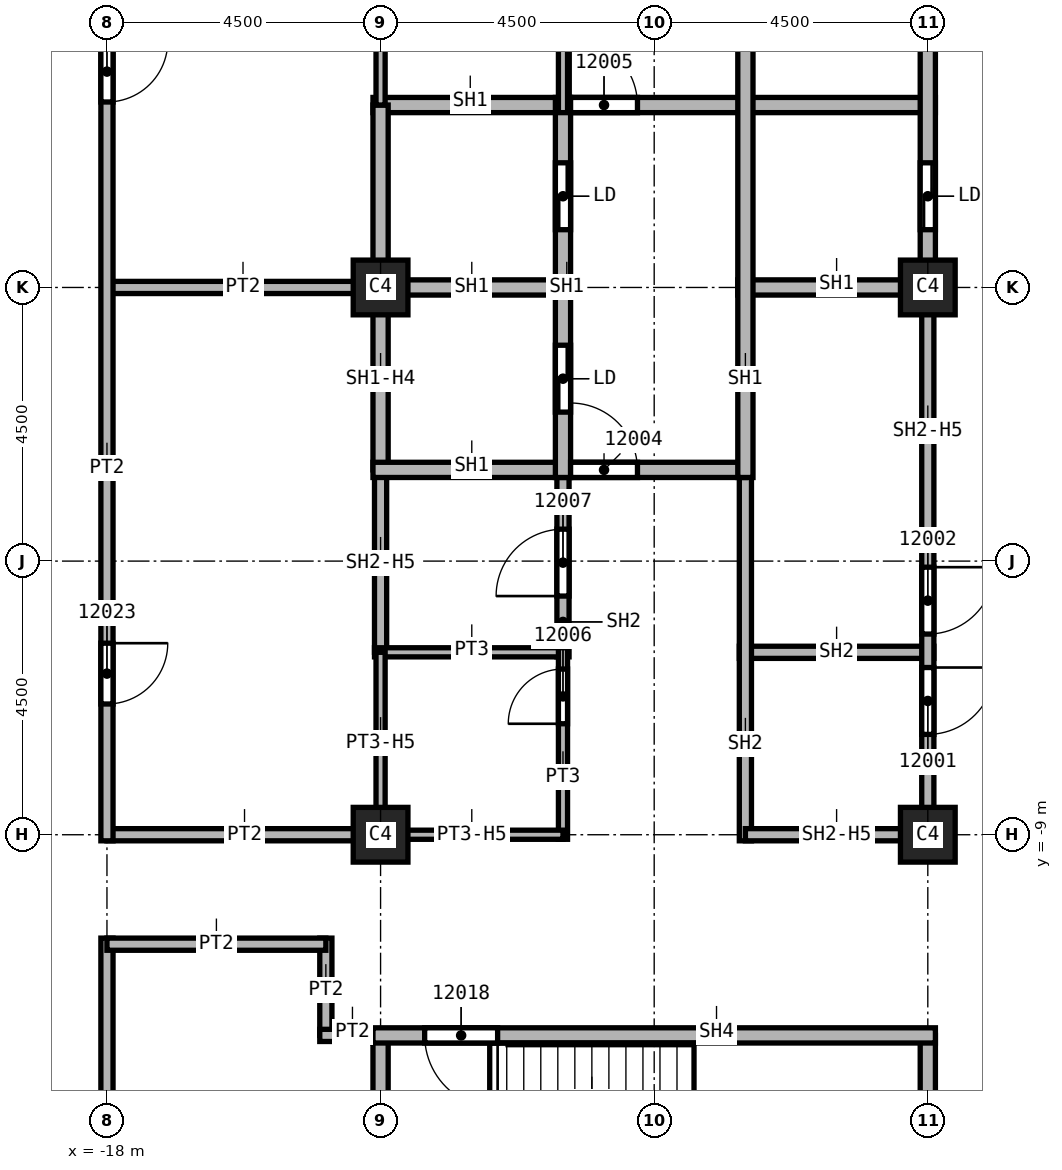
"""IFC4 building model, lengths in metres.
Left out: names, types, materials, properties, quantities, classifications, styles, units other than length and angle.
Written with IfcOpenShell. Run it as: python <this file> out.ifc"""

import sys

from ifc_helpers import new_model, si_unit, direction, frame, frame_2d, origin, origin_2d, place, context, subcontext, project, spatial, rectangle, extrude, element, fill, save


model = new_model("IFC4")
c1 = context("Model", 3, precision=1e-05, world=origin(), true_north=direction((0.0, 1.0)))
c2 = subcontext(c1, "Body", "Model", "MODEL_VIEW")
j1 = project(units=[si_unit("LENGTHUNIT", "METRE"), si_unit("PLANEANGLEUNIT", "RADIAN")], contexts=[c1])
p1 = place(None, origin())
s1 = spatial("IfcSite", under=j1, at=p1, CompositionType="ELEMENT")
p2 = place(p1, origin())
s2 = spatial("IfcBuilding", under=s1, at=p2, CompositionType="ELEMENT")
p3 = place(p2, frame((0.0, 0.0, 196.0)))
s3 = spatial("IfcBuildingStorey", under=s2, at=p3, CompositionType="ELEMENT", Elevation=196.0)
for number, where, z_axis, x_axis in (
    (1, (-4.5, 0.0, 0.0), (0.0, 0.0, 1.0), (1.0, 0.0, 0.0)),
    (2, (-4.5, -9.0, 0.0), (0.0, 0.0, 1.0), (1.0, 0.0, 0.0)),
    (3, (-13.5, 0.0, 0.0), (0.0, 0.0, 1.0), (1.0, 0.0, 0.0)),
    (4, (-13.5, -9.0, 0.0), (0.0, 0.0, 1.0), (1.0, 0.0, 0.0)),
):
    element("IfcColumn", number, at=place(p3, frame(where, z_axis=z_axis, x_axis=x_axis)), inside=s3, PredefinedType="COLUMN", context=c2, shape_type="SweptSolid", body=[
        extrude(rectangle(XDim=0.9, YDim=0.9, at=origin_2d()), origin(), (0.0, 0.0, 1.0), 3.72),
    ])
p4 = place(p3, frame((-18.0, -10.7, 0.0), z_axis=(0.0, 0.0, 1.0), x_axis=(0.0, -1.0, 0.0)))
e5 = element("IfcWall", 5, at=p4, inside=s3, PredefinedType="PARTITIONING", context=c2, shape_type="SweptSolid", body=[
    extrude(rectangle(XDim=11.6, YDim=0.2, at=frame_2d((5.8, 0.0))), origin(), (0.0, 0.0, 1.0), 3.72),
])
p5 = place(p4, frame((8.75, 0.0, 0.0)))
e6 = element("IfcOpeningElement", 6, at=p5, cuts=e5, PredefinedType="OPENING", context=c2, shape_type="SweptSolid", body=[
    extrude(rectangle(XDim=1.0, YDim=2.1, at=frame_2d((0.5, 1.05))), frame((0.0, 0.1, 0.0), z_axis=(0.0, -1.0, 0.0), x_axis=(1.0, 0.0, 0.0)), (0.0, 0.0, 1.0), 0.2),
])
for number, where, z_axis, x_axis in (
    (7, (-18.0, -9.0, 0.0), (0.0, 0.0, 1.0), (1.0, 0.0, 0.0)),
    (8, (-18.0, 0.0, 0.0), (0.0, 0.0, 1.0), (1.0, 0.0, 0.0)),
):
    element("IfcWall", number, at=place(p3, frame(where, z_axis=z_axis, x_axis=x_axis)), inside=s3, PredefinedType="PARTITIONING", context=c2, shape_type="SweptSolid", body=[
        extrude(rectangle(XDim=4.5, YDim=0.2, at=frame_2d((2.25, 0.0))), origin(), (0.0, 0.0, 1.0), 3.72),
    ])
p6 = place(p3, frame((-18.0, 9.1, 0.0), z_axis=(0.0, 0.0, 1.0), x_axis=(0.0, -1.0, 0.0)))
e9 = element("IfcWall", 9, at=p6, inside=s3, PredefinedType="PARTITIONING", context=c2, shape_type="SweptSolid", body=[
    extrude(rectangle(XDim=18.2, YDim=0.2, at=frame_2d((9.1, 0.0))), origin(), (0.0, 0.0, 1.0), 3.72),
])
p7 = place(p6, frame((14.95, 0.0, 0.0)))
e10 = element("IfcOpeningElement", 10, at=p7, cuts=e9, PredefinedType="OPENING", context=c2, shape_type="SweptSolid", body=[
    extrude(rectangle(XDim=1.0, YDim=2.1, at=frame_2d((0.5, 1.05))), frame((0.0, 0.1, 0.0), z_axis=(0.0, -1.0, 0.0), x_axis=(1.0, 0.0, 0.0)), (0.0, 0.0, 1.0), 0.2),
])
p8 = place(p6, frame((5.05, 0.0, 0.0)))
e11 = element("IfcOpeningElement", 11, at=p8, cuts=e9, PredefinedType="OPENING", context=c2, shape_type="SweptSolid", body=[
    extrude(rectangle(XDim=1.0, YDim=2.1, at=frame_2d((0.5, 1.05))), frame((0.0, 0.1, 0.0), z_axis=(0.0, -1.0, 0.0), x_axis=(1.0, 0.0, 0.0)), (0.0, 0.0, 1.0), 0.2),
])
p9 = place(p3, frame((-14.4, -12.3, 0.0), z_axis=(0.0, 0.0, 1.0), x_axis=(0.0, 1.0, 0.0)))
e12 = element("IfcWall", 12, at=p9, inside=s3, PredefinedType="PARTITIONING", context=c2, shape_type="SweptSolid", body=[
    extrude(rectangle(XDim=1.6, YDim=0.2, at=frame_2d((0.8, 0.0))), origin(), (0.0, 0.0, 1.0), 3.72),
])
p10 = place(p3, frame((-14.4, -10.8, 0.0), z_axis=(0.0, 0.0, 1.0), x_axis=(-1.0, 0.0, 0.0)))
e13 = element("IfcWall", 13, at=p10, inside=s3, PredefinedType="PARTITIONING", context=c2, shape_type="SweptSolid", body=[
    extrude(rectangle(XDim=3.6, YDim=0.2, at=frame_2d((1.8, 0.0))), origin(), (0.0, 0.0, 1.0), 3.72),
])
p11 = place(p3, frame((-13.375, -12.3, 0.0), z_axis=(0.0, 0.0, 1.0), x_axis=(-1.0, 0.0, 0.0)))
e14 = element("IfcWall", 14, at=p11, inside=s3, PredefinedType="PARTITIONING", context=c2, shape_type="SweptSolid", body=[
    extrude(rectangle(XDim=1.125, YDim=0.2, at=frame_2d((0.562, 0.0))), origin(), (0.0, 0.0, 1.0), 3.72),
])
p12 = place(p3, frame((-13.5, -6.0, 0.0), z_axis=(0.0, 0.0, 1.0), x_axis=(0.0, 1.0, 0.0)))
e15 = element("IfcWall", 15, at=p12, inside=s3, PredefinedType="SOLIDWALL", context=c2, shape_type="SweptSolid", body=[
    extrude(rectangle(XDim=3.0, YDim=0.2, at=frame_2d((1.5, 0.0))), origin(), (0.0, 0.0, 1.0), 2.958),
])
p13 = place(p3, frame((-10.5, -6.075, 0.0), z_axis=(0.0, 0.0, 1.0), x_axis=(0.0, 1.0, 0.0)))
e16 = element("IfcWall", 16, at=p13, inside=s3, PredefinedType="SOLIDWALL", context=c2, shape_type="SweptSolid", body=[
    extrude(rectangle(XDim=3.2, YDim=0.2, at=frame_2d((1.6, 0.0))), origin(), (0.0, 0.0, 1.0), 3.72),
])
p14 = place(p13, frame((1.0, 0.0, 0.0)))
e17 = element("IfcOpeningElement", 17, at=p14, cuts=e16, PredefinedType="OPENING", context=c2, shape_type="SweptSolid", body=[
    extrude(rectangle(XDim=1.1, YDim=2.1, at=frame_2d((0.55, 1.05))), frame((0.0, 0.1, 0.0), z_axis=(0.0, -1.0, 0.0), x_axis=(1.0, 0.0, 0.0)), (0.0, 0.0, 1.0), 0.2),
])
p15 = place(p3, frame((-7.6, -6.0, 0.0), z_axis=(0.0, 0.0, 1.0), x_axis=(1.0, 0.0, 0.0)))
e18 = element("IfcWall", 18, at=p15, inside=s3, PredefinedType="SOLIDWALL", context=c2, shape_type="SweptSolid", body=[
    extrude(rectangle(XDim=3.2, YDim=0.2, at=frame_2d((1.6, 0.0))), origin(), (0.0, 0.0, 1.0), 3.72),
])
p16 = place(p3, frame((-7.5, -9.1, 0.0), z_axis=(0.0, 0.0, 1.0), x_axis=(0.0, 1.0, 0.0)))
e19 = element("IfcWall", 19, at=p16, inside=s3, PredefinedType="SOLIDWALL", context=c2, shape_type="SweptSolid", body=[
    extrude(rectangle(XDim=6.225, YDim=0.2, at=frame_2d((3.113, 0.0))), origin(), (0.0, 0.0, 1.0), 3.72),
])
p17 = place(p3, frame((-4.5, -9.0, 0.0), z_axis=(0.0, 0.0, 1.0), x_axis=(-1.0, 0.0, 0.0)))
e20 = element("IfcWall", 20, at=p17, inside=s3, PredefinedType="SOLIDWALL", context=c2, shape_type="SweptSolid", body=[
    extrude(rectangle(XDim=3.0, YDim=0.2, at=frame_2d((1.5, 0.0))), origin(), (0.0, 0.0, 1.0), 2.958),
])
p18 = place(p3, frame((-4.5, 0.0, 0.0), z_axis=(0.0, 0.0, 1.0), x_axis=(0.0, -1.0, 0.0)))
e21 = element("IfcWall", 21, at=p18, inside=s3, PredefinedType="SOLIDWALL", context=c2, shape_type="SweptSolid", body=[
    extrude(rectangle(XDim=9.1, YDim=0.2, at=frame_2d((4.55, 0.0))), origin(), (0.0, 0.0, 1.0), 2.958),
])
p19 = place(p18, frame((6.25, 0.0, 0.0)))
e22 = element("IfcOpeningElement", 22, at=p19, cuts=e21, PredefinedType="OPENING", context=c2, shape_type="SweptSolid", body=[
    extrude(rectangle(XDim=1.1, YDim=2.1, at=frame_2d((0.55, 1.05))), frame((0.0, 0.1, 0.0), z_axis=(0.0, -1.0, 0.0), x_axis=(1.0, 0.0, 0.0)), (0.0, 0.0, 1.0), 0.2),
])
p20 = place(p18, frame((4.6, 0.0, 0.0)))
e23 = element("IfcOpeningElement", 23, at=p20, cuts=e21, PredefinedType="OPENING", context=c2, shape_type="SweptSolid", body=[
    extrude(rectangle(XDim=1.1, YDim=2.1, at=frame_2d((0.55, 1.05))), frame((0.0, 0.1, 0.0), z_axis=(0.0, -1.0, 0.0), x_axis=(1.0, 0.0, 0.0)), (0.0, 0.0, 1.0), 0.2),
])
p21 = place(p3, frame((-13.625, 0.0, 0.0), z_axis=(0.0, 0.0, 1.0), x_axis=(1.0, 0.0, 0.0)))
e24 = element("IfcWall", 24, at=p21, inside=s3, PredefinedType="SOLIDWALL", context=c2, shape_type="SweptSolid", body=[
    extrude(rectangle(XDim=3.125, YDim=0.25, at=frame_2d((1.562, 0.0))), origin(), (0.0, 0.0, 1.0), 3.72),
])
p22 = place(p3, frame((-13.625, 3.0, 0.0), z_axis=(0.0, 0.0, 1.0), x_axis=(1.0, 0.0, 0.0)))
e25 = element("IfcWall", 25, at=p22, inside=s3, PredefinedType="SOLIDWALL", context=c2, shape_type="SweptSolid", body=[
    extrude(rectangle(XDim=9.25, YDim=0.25, at=frame_2d((4.625, 0.0))), origin(), (0.0, 0.0, 1.0), 3.72),
])
p23 = place(p22, frame((3.25, 0.0, 0.0)))
e26 = element("IfcOpeningElement", 26, at=p23, cuts=e25, PredefinedType="OPENING", context=c2, shape_type="SweptSolid", body=[
    extrude(rectangle(XDim=1.1, YDim=2.1, at=frame_2d((0.55, 1.05))), frame((0.0, 0.125, 0.0), z_axis=(0.0, -1.0, 0.0), x_axis=(1.0, 0.0, 0.0)), (0.0, 0.0, 1.0), 0.25),
])
p24 = place(p3, frame((-13.5, -3.0, 0.0), z_axis=(0.0, 0.0, 1.0), x_axis=(0.0, 1.0, 0.0)))
e27 = element("IfcWall", 27, at=p24, inside=s3, PredefinedType="SOLIDWALL", context=c2, shape_type="SweptSolid", body=[
    extrude(rectangle(XDim=6.0, YDim=0.25, at=frame_2d((3.0, 0.0))), origin(), (0.0, 0.0, 1.0), 2.958),
])
p25 = place(p3, frame((-13.625, -3.0, 0.0), z_axis=(0.0, 0.0, 1.0), x_axis=(1.0, 0.0, 0.0)))
e28 = element("IfcWall", 28, at=p25, inside=s3, PredefinedType="SOLIDWALL", context=c2, shape_type="SweptSolid", body=[
    extrude(rectangle(XDim=6.125, YDim=0.25, at=frame_2d((3.062, 0.0))), origin(), (0.0, 0.0, 1.0), 3.72),
])
p26 = place(p25, frame((3.25, 0.0, 0.0)))
e29 = element("IfcOpeningElement", 29, at=p26, cuts=e28, PredefinedType="OPENING", context=c2, shape_type="SweptSolid", body=[
    extrude(rectangle(XDim=1.1, YDim=2.1, at=frame_2d((0.55, 1.05))), frame((0.0, 0.125, 0.0), z_axis=(0.0, -1.0, 0.0), x_axis=(1.0, 0.0, 0.0)), (0.0, 0.0, 1.0), 0.25),
])
p27 = place(p3, frame((-10.5, -3.125, 0.0), z_axis=(0.0, 0.0, 1.0), x_axis=(0.0, 1.0, 0.0)))
e30 = element("IfcWall", 30, at=p27, inside=s3, PredefinedType="SOLIDWALL", context=c2, shape_type="SweptSolid", body=[
    extrude(rectangle(XDim=6.25, YDim=0.25, at=frame_2d((3.125, 0.0))), origin(), (0.0, 0.0, 1.0), 3.72),
])
p28 = place(p27, frame((1.075, 0.0, 0.0)))
e31 = element("IfcOpeningElement", 31, at=p28, cuts=e30, PredefinedType="OPENING", context=c2, shape_type="SweptSolid", body=[
    extrude(rectangle(XDim=1.1, YDim=2.1, at=frame_2d((0.55, 1.05))), frame((0.0, 0.125, 0.0), z_axis=(0.0, -1.0, 0.0), x_axis=(1.0, 0.0, 0.0)), (0.0, 0.0, 1.0), 0.25),
])
p29 = place(p27, frame((4.075, 0.0, 0.0)))
e32 = element("IfcOpeningElement", 32, at=p29, cuts=e30, PredefinedType="OPENING", context=c2, shape_type="SweptSolid", body=[
    extrude(rectangle(XDim=1.1, YDim=2.1, at=frame_2d((0.55, 1.05))), frame((0.0, 0.125, 0.0), z_axis=(0.0, -1.0, 0.0), x_axis=(1.0, 0.0, 0.0)), (0.0, 0.0, 1.0), 0.25),
])
p30 = place(p3, frame((-7.625, 0.0, 0.0), z_axis=(0.0, 0.0, 1.0), x_axis=(1.0, 0.0, 0.0)))
e33 = element("IfcWall", 33, at=p30, inside=s3, PredefinedType="SOLIDWALL", context=c2, shape_type="SweptSolid", body=[
    extrude(rectangle(XDim=3.25, YDim=0.25, at=frame_2d((1.625, 0.0))), origin(), (0.0, 0.0, 1.0), 3.72),
])
p31 = place(p3, frame((-7.5, -3.125, 0.0), z_axis=(0.0, 0.0, 1.0), x_axis=(0.0, 1.0, 0.0)))
e34 = element("IfcWall", 34, at=p31, inside=s3, PredefinedType="SOLIDWALL", context=c2, shape_type="SweptSolid", body=[
    extrude(rectangle(XDim=9.125, YDim=0.25, at=frame_2d((4.562, 0.0))), origin(), (0.0, 0.0, 1.0), 3.72),
])
p32 = place(p3, frame((-4.5, 6.0, 0.0), z_axis=(0.0, 0.0, 1.0), x_axis=(0.0, -1.0, 0.0)))
e35 = element("IfcWall", 35, at=p32, inside=s3, PredefinedType="SOLIDWALL", context=c2, shape_type="SweptSolid", body=[
    extrude(rectangle(XDim=6.0, YDim=0.25, at=frame_2d((3.0, 0.0))), origin(), (0.0, 0.0, 1.0), 2.958),
])
p33 = place(p32, frame((3.95, 0.0, 0.0)))
e36 = element("IfcOpeningElement", 36, at=p33, cuts=e35, PredefinedType="OPENING", context=c2, shape_type="SweptSolid", body=[
    extrude(rectangle(XDim=1.1, YDim=2.1, at=frame_2d((0.55, 1.05))), frame((0.0, 0.125, 0.0), z_axis=(0.0, -1.0, 0.0), x_axis=(1.0, 0.0, 0.0)), (0.0, 0.0, 1.0), 0.25),
])
p34 = place(p32, frame((0.95, 0.0, 0.0)))
e37 = element("IfcOpeningElement", 37, at=p34, cuts=e35, PredefinedType="OPENING", context=c2, shape_type="SweptSolid", body=[
    extrude(rectangle(XDim=1.1, YDim=2.1, at=frame_2d((0.55, 1.05))), frame((0.0, 0.125, 0.0), z_axis=(0.0, -1.0, 0.0), x_axis=(1.0, 0.0, 0.0)), (0.0, 0.0, 1.0), 0.25),
])
p35 = place(p3, frame((-13.5, -16.8, 0.0), z_axis=(0.0, 0.0, 1.0), x_axis=(0.0, 1.0, 0.0)))
e38 = element("IfcWall", 38, at=p35, inside=s3, PredefinedType="SOLIDWALL", context=c2, shape_type="SweptSolid", body=[
    extrude(rectangle(XDim=4.5, YDim=0.25, at=frame_2d((2.25, 0.0))), origin(), (0.0, 0.0, 1.0), 3.72),
])
p36 = place(p3, frame((-4.5, -12.3, 0.0), z_axis=(0.0, 0.0, 1.0), x_axis=(0.0, -1.0, 0.0)))
e39 = element("IfcWall", 39, at=p36, inside=s3, PredefinedType="SOLIDWALL", context=c2, shape_type="SweptSolid", body=[
    extrude(rectangle(XDim=4.625, YDim=0.25, at=frame_2d((2.312, 0.0))), origin(), (0.0, 0.0, 1.0), 3.72),
])
p37 = place(p3, frame((-4.375, -12.3, 0.0), z_axis=(0.0, 0.0, 1.0), x_axis=(-1.0, 0.0, 0.0)))
e40 = element("IfcWall", 40, at=p37, inside=s3, PredefinedType="SOLIDWALL", context=c2, shape_type="SweptSolid", body=[
    extrude(rectangle(XDim=9.25, YDim=0.25, at=frame_2d((4.625, 0.0))), origin(), (0.0, 0.0, 1.0), 3.72),
])
p38 = place(p37, frame((7.2, 0.0, 0.0)))
e41 = element("IfcOpeningElement", 41, at=p38, cuts=e40, PredefinedType="OPENING", context=c2, shape_type="SweptSolid", body=[
    extrude(rectangle(XDim=1.2, YDim=2.1, at=frame_2d((0.6, 1.05))), frame((0.0, 0.125, 0.0), z_axis=(0.0, -1.0, 0.0), x_axis=(1.0, 0.0, 0.0)), (0.0, 0.0, 1.0), 0.25),
])
p39 = place(p3, frame((-13.6, -6.0, 0.0), z_axis=(0.0, 0.0, 1.0), x_axis=(1.0, 0.0, 0.0)))
e42 = element("IfcWall", 42, at=p39, inside=s3, PredefinedType="PARTITIONING", context=c2, shape_type="SweptSolid", body=[
    extrude(rectangle(XDim=3.1, YDim=0.15, at=frame_2d((1.55, 0.0))), origin(), (0.0, 0.0, 1.0), 3.72),
])
p40 = place(p3, frame((-13.5, -9.1, 0.0), z_axis=(0.0, 0.0, 1.0), x_axis=(0.0, 1.0, 0.0)))
e43 = element("IfcWall", 43, at=p40, inside=s3, PredefinedType="PARTITIONING", context=c2, shape_type="SweptSolid", body=[
    extrude(rectangle(XDim=3.1, YDim=0.15, at=frame_2d((1.55, 0.0))), origin(), (0.0, 0.0, 1.0), 2.958),
])
p41 = place(p3, frame((-13.5, 3.0, 0.0), z_axis=(0.0, 0.0, 1.0), x_axis=(0.0, 1.0, 0.0)))
e44 = element("IfcWall", 44, at=p41, inside=s3, PredefinedType="PARTITIONING", context=c2, shape_type="SweptSolid", body=[
    extrude(rectangle(XDim=6.1, YDim=0.15, at=frame_2d((3.05, 0.0))), origin(), (0.0, 0.0, 1.0), 2.958),
])
p42 = place(p3, frame((-10.5, -9.075, 0.0), z_axis=(0.0, 0.0, 1.0), x_axis=(0.0, 1.0, 0.0)))
e45 = element("IfcWall", 45, at=p42, inside=s3, PredefinedType="PARTITIONING", context=c2, shape_type="SweptSolid", body=[
    extrude(rectangle(XDim=3.15, YDim=0.15, at=frame_2d((1.575, 0.0))), origin(), (0.0, 0.0, 1.0), 3.72),
])
p43 = place(p42, frame((1.9, 0.0, 0.0)))
e46 = element("IfcOpeningElement", 46, at=p43, cuts=e45, PredefinedType="OPENING", context=c2, shape_type="SweptSolid", body=[
    extrude(rectangle(XDim=0.9, YDim=2.1, at=frame_2d((0.45, 1.05))), frame((0.0, 0.075, 0.0), z_axis=(0.0, -1.0, 0.0), x_axis=(1.0, 0.0, 0.0)), (0.0, 0.0, 1.0), 0.15),
])
p44 = place(p3, frame((-10.5, -9.0, 0.0), z_axis=(0.0, 0.0, 1.0), x_axis=(-1.0, 0.0, 0.0)))
e47 = element("IfcWall", 47, at=p44, inside=s3, PredefinedType="PARTITIONING", context=c2, shape_type="SweptSolid", body=[
    extrude(rectangle(XDim=3.075, YDim=0.15, at=frame_2d((1.538, 0.0))), origin(), (0.0, 0.0, 1.0), 2.958),
])
p45 = place(p3, frame((-10.5, 2.875, 0.0), z_axis=(0.0, 0.0, 1.0), x_axis=(0.0, 1.0, 0.0)))
e48 = element("IfcWall", 48, at=p45, inside=s3, PredefinedType="PARTITIONING", context=c2, shape_type="SweptSolid", body=[
    extrude(rectangle(XDim=6.2, YDim=0.15, at=frame_2d((3.1, 0.0))), origin(), (0.0, 0.0, 1.0), 3.72),
])
p46 = place(p45, frame((1.75, 0.0, 0.0)))
e49 = element("IfcOpeningElement", 49, at=p46, cuts=e48, PredefinedType="OPENING", context=c2, shape_type="SweptSolid", body=[
    extrude(rectangle(XDim=0.9, YDim=2.1, at=frame_2d((0.45, 1.05))), frame((0.0, 0.075, 0.0), z_axis=(0.0, -1.0, 0.0), x_axis=(1.0, 0.0, 0.0)), (0.0, 0.0, 1.0), 0.15),
])
p47 = place(p19, origin())
e50 = element("IfcDoor", 50, at=p47, inside=s3, OperationType="SINGLE_SWING_RIGHT", PredefinedType="DOOR", context=c2, shape_type="SweptSolid", body=[
    extrude(rectangle(XDim=1.1, YDim=2.1, at=frame_2d((0.55, 1.05))), frame((0.0, 0.025, 0.0), z_axis=(0.0, -1.0, 0.0), x_axis=(1.0, 0.0, 0.0)), (0.0, 0.0, 1.0), 0.05),
])
fill(e22, e50)
p48 = place(p20, origin())
e51 = element("IfcDoor", 51, at=p48, inside=s3, OperationType="SINGLE_SWING_LEFT", PredefinedType="DOOR", context=c2, shape_type="SweptSolid", body=[
    extrude(rectangle(XDim=1.1, YDim=2.1, at=frame_2d((0.55, 1.05))), frame((0.0, 0.025, 0.0), z_axis=(0.0, -1.0, 0.0), x_axis=(1.0, 0.0, 0.0)), (0.0, 0.0, 1.0), 0.05),
])
fill(e23, e51)
p49 = place(p26, origin())
e52 = element("IfcDoor", 52, at=p49, inside=s3, OperationType="SINGLE_SWING_LEFT", PredefinedType="DOOR", context=c2, shape_type="SweptSolid", body=[
    extrude(rectangle(XDim=1.1, YDim=2.1, at=frame_2d((0.55, 1.05))), frame((0.0, 0.025, 0.0), z_axis=(0.0, -1.0, 0.0), x_axis=(1.0, 0.0, 0.0)), (0.0, 0.0, 1.0), 0.05),
])
fill(e29, e52)
p50 = place(p23, origin())
e53 = element("IfcDoor", 53, at=p50, inside=s3, OperationType="SINGLE_SWING_RIGHT", PredefinedType="DOOR", context=c2, shape_type="SweptSolid", body=[
    extrude(rectangle(XDim=1.1, YDim=2.1, at=frame_2d((0.55, 1.05))), frame((0.0, 0.025, 0.0), z_axis=(0.0, -1.0, 0.0), x_axis=(1.0, 0.0, 0.0)), (0.0, 0.0, 1.0), 0.05),
])
fill(e26, e53)
p51 = place(p43, origin())
e54 = element("IfcDoor", 54, at=p51, inside=s3, OperationType="SINGLE_SWING_LEFT", PredefinedType="DOOR", context=c2, shape_type="SweptSolid", body=[
    extrude(rectangle(XDim=0.9, YDim=2.1, at=frame_2d((0.45, 1.05))), frame((0.0, 0.025, 0.0), z_axis=(0.0, -1.0, 0.0), x_axis=(1.0, 0.0, 0.0)), (0.0, 0.0, 1.0), 0.05),
])
fill(e46, e54)
p52 = place(p14, origin())
e55 = element("IfcDoor", 55, at=p52, inside=s3, OperationType="SINGLE_SWING_RIGHT", PredefinedType="DOOR", context=c2, shape_type="SweptSolid", body=[
    extrude(rectangle(XDim=1.1, YDim=2.1, at=frame_2d((0.55, 1.05))), frame((0.0, 0.025, 0.0), z_axis=(0.0, -1.0, 0.0), x_axis=(1.0, 0.0, 0.0)), (0.0, 0.0, 1.0), 0.05),
])
fill(e17, e55)
p53 = place(p38, origin())
e56 = element("IfcDoor", 56, at=p53, inside=s3, OperationType="SINGLE_SWING_LEFT", PredefinedType="DOOR", context=c2, shape_type="SweptSolid", body=[
    extrude(rectangle(XDim=1.2, YDim=2.1, at=frame_2d((0.6, 1.05))), frame((0.0, 0.025, 0.0), z_axis=(0.0, -1.0, 0.0), x_axis=(1.0, 0.0, 0.0)), (0.0, 0.0, 1.0), 0.05),
])
fill(e41, e56)
p54 = place(p7, origin())
e57 = element("IfcDoor", 57, at=p54, inside=s3, OperationType="SINGLE_SWING_RIGHT", PredefinedType="DOOR", context=c2, shape_type="SweptSolid", body=[
    extrude(rectangle(XDim=1.0, YDim=2.1, at=frame_2d((0.5, 1.05))), frame((0.0, 0.025, 0.0), z_axis=(0.0, -1.0, 0.0), x_axis=(1.0, 0.0, 0.0)), (0.0, 0.0, 1.0), 0.05),
])
fill(e10, e57)
p55 = place(p8, origin())
e58 = element("IfcDoor", 58, at=p55, inside=s3, OperationType="SINGLE_SWING_LEFT", PredefinedType="DOOR", context=c2, shape_type="SweptSolid", body=[
    extrude(rectangle(XDim=1.0, YDim=2.1, at=frame_2d((0.5, 1.05))), frame((0.0, 0.025, 0.0), z_axis=(0.0, -1.0, 0.0), x_axis=(1.0, 0.0, 0.0)), (0.0, 0.0, 1.0), 0.05),
])
fill(e11, e58)
p56 = place(p33, origin())
e59 = element("IfcDoor", 59, at=p56, inside=s3, OperationType="SLIDING_TO_LEFT", PredefinedType="DOOR", context=c2, shape_type="SweptSolid", body=[
    extrude(rectangle(XDim=1.1, YDim=2.1, at=frame_2d((0.55, 1.05))), frame((0.0, 0.025, 0.0), z_axis=(0.0, -1.0, 0.0), x_axis=(1.0, 0.0, 0.0)), (0.0, 0.0, 1.0), 0.05),
])
fill(e36, e59)
p57 = place(p28, origin())
e60 = element("IfcDoor", 60, at=p57, inside=s3, OperationType="SLIDING_TO_LEFT", PredefinedType="DOOR", context=c2, shape_type="SweptSolid", body=[
    extrude(rectangle(XDim=1.1, YDim=2.1, at=frame_2d((0.55, 1.05))), frame((0.0, 0.025, 0.0), z_axis=(0.0, -1.0, 0.0), x_axis=(1.0, 0.0, 0.0)), (0.0, 0.0, 1.0), 0.05),
])
fill(e31, e60)
p58 = place(p29, origin())
e61 = element("IfcDoor", 61, at=p58, inside=s3, OperationType="SLIDING_TO_LEFT", PredefinedType="DOOR", context=c2, shape_type="SweptSolid", body=[
    extrude(rectangle(XDim=1.1, YDim=2.1, at=frame_2d((0.55, 1.05))), frame((0.0, 0.025, 0.0), z_axis=(0.0, -1.0, 0.0), x_axis=(1.0, 0.0, 0.0)), (0.0, 0.0, 1.0), 0.05),
])
fill(e32, e61)
save(model, sys.argv[1])
